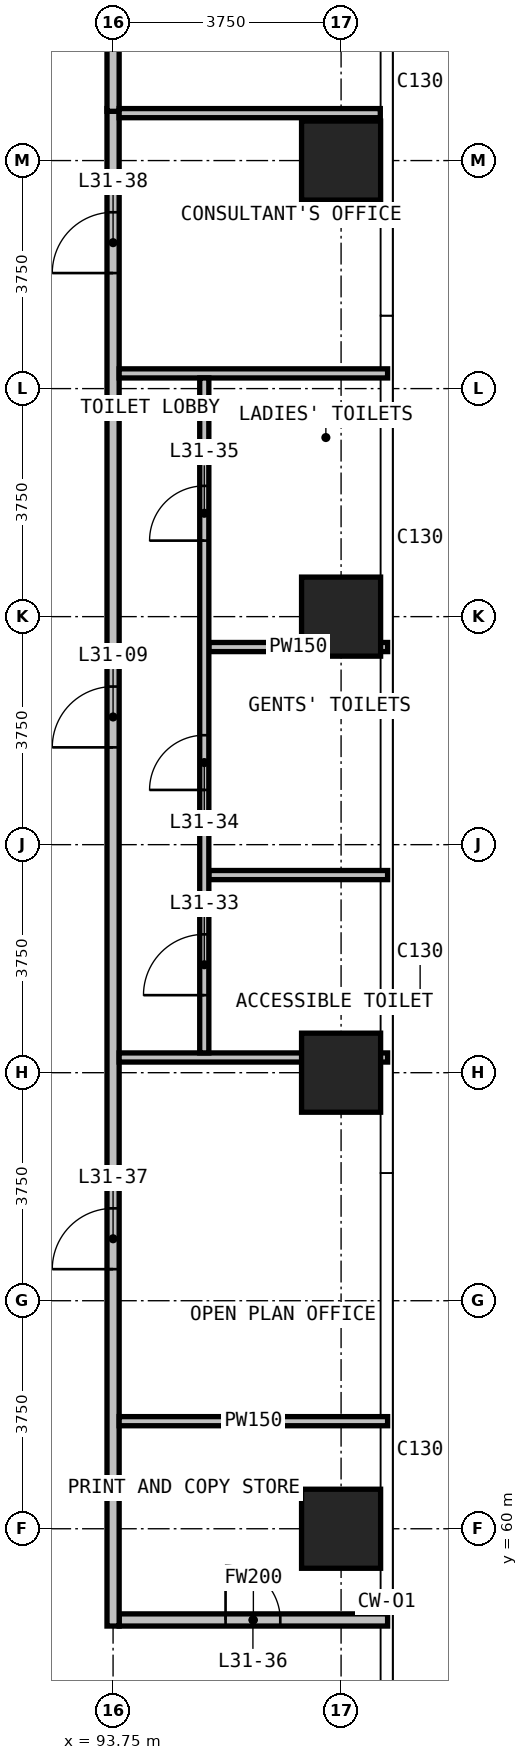
"""IFC4 building model, lengths in metres.
Left out: names, types, materials, properties, quantities, classifications, styles, units other than length and angle.
Written with IfcOpenShell. Run it as: python <this file> out.ifc"""

import sys

from ifc_helpers import new_model, si_unit, direction, frame, frame_2d, origin, origin_2d, place, context, subcontext, project, spatial, rectangle, extrude, element, fill, save


model = new_model("IFC4")
c1 = context("Model", 3, precision=1e-05, world=origin(), true_north=direction((0.0, 1.0)))
c2 = subcontext(c1, "Body", "Model", "MODEL_VIEW")
j1 = project(units=[si_unit("LENGTHUNIT", "METRE"), si_unit("PLANEANGLEUNIT", "RADIAN")], contexts=[c1])
p1 = place(None, origin())
s1 = spatial("IfcSite", under=j1, at=p1, CompositionType="ELEMENT")
p2 = place(p1, origin())
s2 = spatial("IfcBuilding", under=s1, at=p2, CompositionType="ELEMENT")
p3 = place(p2, frame((0.0, 0.0, 125.2)))
s3 = spatial("IfcBuildingStorey", under=s2, at=p3, CompositionType="ELEMENT", Elevation=125.2)
for number, where, z_axis, x_axis in (
    (1, (97.5, 60.0, 0.0), (0.0, 0.0, 1.0), (1.0, 0.0, 0.0)),
    (2, (97.5, 67.5, 0.0), (0.0, 0.0, 1.0), (1.0, 0.0, 0.0)),
    (3, (97.5, 75.0, 0.0), (0.0, 0.0, 1.0), (1.0, 0.0, 0.0)),
    (4, (97.5, 82.5, 0.0), (0.0, 0.0, 1.0), (1.0, 0.0, 0.0)),
):
    element("IfcColumn", number, at=place(p3, frame(where, z_axis=z_axis, x_axis=x_axis)), inside=s3, PredefinedType="COLUMN", context=c2, shape_type="SweptSolid", body=[
        extrude(rectangle(XDim=1.3, YDim=1.3, at=origin_2d()), origin(), (0.0, 0.0, 1.0), 3.6),
    ])
p4 = place(p3, frame((93.85, 58.5, 0.0), z_axis=(0.0, 0.0, 1.0), x_axis=(1.0, 0.0, 0.0)))
e5 = element("IfcWall", 5, at=p4, inside=s3, PredefinedType="PARTITIONING", context=c2, shape_type="SweptSolid", body=[
    extrude(rectangle(XDim=4.415, YDim=0.2, at=frame_2d((2.208, 0.0))), origin(), (0.0, 0.0, 1.0), 3.3),
])
p5 = place(p4, frame((1.75, 0.0, 0.0)))
e6 = element("IfcOpeningElement", 6, at=p5, cuts=e5, PredefinedType="OPENING", context=c2, shape_type="SweptSolid", body=[
    extrude(rectangle(XDim=0.9, YDim=2.2, at=frame_2d((0.45, 1.1))), frame((0.0, 0.11, 0.0), z_axis=(0.0, -1.0, 0.0), x_axis=(1.0, 0.0, 0.0)), (0.0, 0.0, 1.0), 0.22),
])
p6 = place(p3, frame((93.75, 58.4, 0.0), z_axis=(0.0, 0.0, 1.0), x_axis=(0.0, 1.0, 0.0)))
e7 = element("IfcWall", 7, at=p6, inside=s3, PredefinedType="PARTITIONING", context=c2, shape_type="SweptSolid", body=[
    extrude(rectangle(XDim=24.955, YDim=0.2, at=frame_2d((12.478, 0.0))), origin(), (0.0, 0.0, 1.0), 3.3),
])
p7 = place(p6, frame((14.45, 0.0, 0.0)))
e8 = element("IfcOpeningElement", 8, at=p7, cuts=e7, PredefinedType="OPENING", context=c2, shape_type="SweptSolid", body=[
    extrude(rectangle(XDim=1.0, YDim=2.2, at=frame_2d((0.5, 1.1))), frame((0.0, 0.11, 0.0), z_axis=(0.0, -1.0, 0.0), x_axis=(1.0, 0.0, 0.0)), (0.0, 0.0, 1.0), 0.22),
])
p8 = place(p6, frame((5.869, 0.0, 0.0)))
e9 = element("IfcOpeningElement", 9, at=p8, cuts=e7, PredefinedType="OPENING", context=c2, shape_type="SweptSolid", body=[
    extrude(rectangle(XDim=1.0, YDim=2.2, at=frame_2d((0.5, 1.1))), frame((0.0, 0.11, 0.0), z_axis=(0.0, -1.0, 0.0), x_axis=(1.0, 0.0, 0.0)), (0.0, 0.0, 1.0), 0.22),
])
p9 = place(p6, frame((22.25, 0.0, 0.0)))
e10 = element("IfcOpeningElement", 10, at=p9, cuts=e7, PredefinedType="OPENING", context=c2, shape_type="SweptSolid", body=[
    extrude(rectangle(XDim=1.0, YDim=2.2, at=frame_2d((0.5, 1.1))), frame((0.0, 0.11, 0.0), z_axis=(0.0, -1.0, 0.0), x_axis=(1.0, 0.0, 0.0)), (0.0, 0.0, 1.0), 0.22),
])
p10 = place(p3, frame((93.75, 83.31, 0.0), z_axis=(0.0, 0.0, 1.0), x_axis=(0.0, 1.0, 0.0)))
e11 = element("IfcWall", 11, at=p10, inside=s3, PredefinedType="PARTITIONING", context=c2, shape_type="SweptSolid", body=[
    extrude(rectangle(XDim=7.335, YDim=0.2, at=frame_2d((3.667, 0.0))), origin(), (0.0, 0.0, 1.0), 3.3),
])
for number, where, z_axis, x_axis in (
    (12, (93.85, 61.769, 0.0), (0.0, 0.0, 1.0), (1.0, 0.0, 0.0)),
    (13, (93.85, 67.75, 0.0), (0.0, 0.0, 1.0), (1.0, 0.0, 0.0)),
):
    element("IfcWall", number, at=place(p3, frame(where, z_axis=z_axis, x_axis=x_axis)), inside=s3, PredefinedType="PARTITIONING", context=c2, shape_type="SweptSolid", body=[
        extrude(rectangle(XDim=4.415, YDim=0.15, at=frame_2d((2.208, 0.0))), origin(), (0.0, 0.0, 1.0), 3.3),
    ])
for number, where, z_axis, x_axis in (
    (14, (95.325, 70.75, 0.0), (0.0, 0.0, 1.0), (1.0, 0.0, 0.0)),
    (15, (95.325, 74.5, 0.0), (0.0, 0.0, 1.0), (1.0, 0.0, 0.0)),
):
    element("IfcWall", number, at=place(p3, frame(where, z_axis=z_axis, x_axis=x_axis)), inside=s3, PredefinedType="PARTITIONING", context=c2, shape_type="SweptSolid", body=[
        extrude(rectangle(XDim=2.94, YDim=0.15, at=frame_2d((1.47, 0.0))), origin(), (0.0, 0.0, 1.0), 3.3),
    ])
p11 = place(p3, frame((93.85, 79.0, 0.0), z_axis=(0.0, 0.0, 1.0), x_axis=(1.0, 0.0, 0.0)))
e16 = element("IfcWall", 16, at=p11, inside=s3, PredefinedType="PARTITIONING", context=c2, shape_type="SweptSolid", body=[
    extrude(rectangle(XDim=4.415, YDim=0.15, at=frame_2d((2.208, 0.0))), origin(), (0.0, 0.0, 1.0), 3.3),
])
p12 = place(p3, frame((93.85, 83.28, 0.0), z_axis=(0.0, 0.0, 1.0), x_axis=(1.0, 0.0, 0.0)))
e17 = element("IfcWall", 17, at=p12, inside=s3, PredefinedType="PARTITIONING", context=c2, shape_type="SweptSolid", body=[
    extrude(rectangle(XDim=4.295, YDim=0.15, at=frame_2d((2.147, 0.0))), origin(), (0.0, 0.0, 1.0), 3.3),
])
p13 = place(p3, frame((95.25, 67.825, 0.0), z_axis=(0.0, 0.0, 1.0), x_axis=(0.0, 1.0, 0.0)))
e18 = element("IfcWall", 18, at=p13, inside=s3, PredefinedType="PARTITIONING", context=c2, shape_type="SweptSolid", body=[
    extrude(rectangle(XDim=11.1, YDim=0.15, at=frame_2d((5.55, 0.0))), origin(), (0.0, 0.0, 1.0), 3.3),
])
p14 = place(p13, frame((0.95, 0.0, 0.0)))
e19 = element("IfcOpeningElement", 19, at=p14, cuts=e18, PredefinedType="OPENING", context=c2, shape_type="SweptSolid", body=[
    extrude(rectangle(XDim=1.0, YDim=2.2, at=frame_2d((0.5, 1.1))), frame((0.0, 0.085, 0.0), z_axis=(0.0, -1.0, 0.0), x_axis=(1.0, 0.0, 0.0)), (0.0, 0.0, 1.0), 0.17),
])
p15 = place(p13, frame((4.325, 0.0, 0.0)))
e20 = element("IfcOpeningElement", 20, at=p15, cuts=e18, PredefinedType="OPENING", context=c2, shape_type="SweptSolid", body=[
    extrude(rectangle(XDim=0.9, YDim=2.2, at=frame_2d((0.45, 1.1))), frame((0.0, 0.085, 0.0), z_axis=(0.0, -1.0, 0.0), x_axis=(1.0, 0.0, 0.0)), (0.0, 0.0, 1.0), 0.17),
])
p16 = place(p13, frame((8.425, 0.0, 0.0)))
e21 = element("IfcOpeningElement", 21, at=p16, cuts=e18, PredefinedType="OPENING", context=c2, shape_type="SweptSolid", body=[
    extrude(rectangle(XDim=0.9, YDim=2.2, at=frame_2d((0.45, 1.1))), frame((0.0, 0.085, 0.0), z_axis=(0.0, -1.0, 0.0), x_axis=(1.0, 0.0, 0.0)), (0.0, 0.0, 1.0), 0.17),
])
p17 = place(p7, origin())
e22 = element("IfcDoor", 22, at=p17, inside=s3, OperationType="SINGLE_SWING_RIGHT", PredefinedType="DOOR", context=c2, shape_type="SweptSolid", body=[
    extrude(rectangle(XDim=1.0, YDim=2.2, at=frame_2d((0.5, 1.1))), frame((0.0, 0.025, 0.0), z_axis=(0.0, -1.0, 0.0), x_axis=(1.0, 0.0, 0.0)), (0.0, 0.0, 1.0), 0.05),
])
fill(e8, e22)
p18 = place(p14, origin())
e23 = element("IfcDoor", 23, at=p18, inside=s3, OperationType="SINGLE_SWING_LEFT", PredefinedType="DOOR", context=c2, shape_type="SweptSolid", body=[
    extrude(rectangle(XDim=1.0, YDim=2.2, at=frame_2d((0.5, 1.1))), frame((0.0, 0.025, 0.0), z_axis=(0.0, -1.0, 0.0), x_axis=(1.0, 0.0, 0.0)), (0.0, 0.0, 1.0), 0.05),
])
fill(e19, e23)
p19 = place(p15, origin())
e24 = element("IfcDoor", 24, at=p19, inside=s3, OperationType="SINGLE_SWING_RIGHT", PredefinedType="DOOR", context=c2, shape_type="SweptSolid", body=[
    extrude(rectangle(XDim=0.9, YDim=2.2, at=frame_2d((0.45, 1.1))), frame((0.0, 0.025, 0.0), z_axis=(0.0, -1.0, 0.0), x_axis=(1.0, 0.0, 0.0)), (0.0, 0.0, 1.0), 0.05),
])
fill(e20, e24)
p20 = place(p16, origin())
e25 = element("IfcDoor", 25, at=p20, inside=s3, OperationType="SINGLE_SWING_LEFT", PredefinedType="DOOR", context=c2, shape_type="SweptSolid", body=[
    extrude(rectangle(XDim=0.9, YDim=2.2, at=frame_2d((0.45, 1.1))), frame((0.0, 0.025, 0.0), z_axis=(0.0, -1.0, 0.0), x_axis=(1.0, 0.0, 0.0)), (0.0, 0.0, 1.0), 0.05),
])
fill(e21, e25)
p21 = place(p5, origin())
e26 = element("IfcDoor", 26, at=p21, inside=s3, OperationType="SINGLE_SWING_RIGHT", PredefinedType="DOOR", context=c2, shape_type="SweptSolid", body=[
    extrude(rectangle(XDim=0.9, YDim=2.2, at=frame_2d((0.45, 1.1))), frame((0.0, 0.025, 0.0), z_axis=(0.0, -1.0, 0.0), x_axis=(1.0, 0.0, 0.0)), (0.0, 0.0, 1.0), 0.05),
])
fill(e6, e26)
p22 = place(p8, origin())
e27 = element("IfcDoor", 27, at=p22, inside=s3, OperationType="SINGLE_SWING_LEFT", PredefinedType="DOOR", context=c2, shape_type="SweptSolid", body=[
    extrude(rectangle(XDim=1.0, YDim=2.2, at=frame_2d((0.5, 1.1))), frame((0.0, 0.025, 0.0), z_axis=(0.0, -1.0, 0.0), x_axis=(1.0, 0.0, 0.0)), (0.0, 0.0, 1.0), 0.05),
])
fill(e9, e27)
p23 = place(p9, origin())
e28 = element("IfcDoor", 28, at=p23, inside=s3, OperationType="SINGLE_SWING_LEFT", PredefinedType="DOOR", context=c2, shape_type="SweptSolid", body=[
    extrude(rectangle(XDim=1.0, YDim=2.2, at=frame_2d((0.5, 1.1))), frame((0.0, 0.025, 0.0), z_axis=(0.0, -1.0, 0.0), x_axis=(1.0, 0.0, 0.0)), (0.0, 0.0, 1.0), 0.05),
])
fill(e10, e28)
save(model, sys.argv[1])
